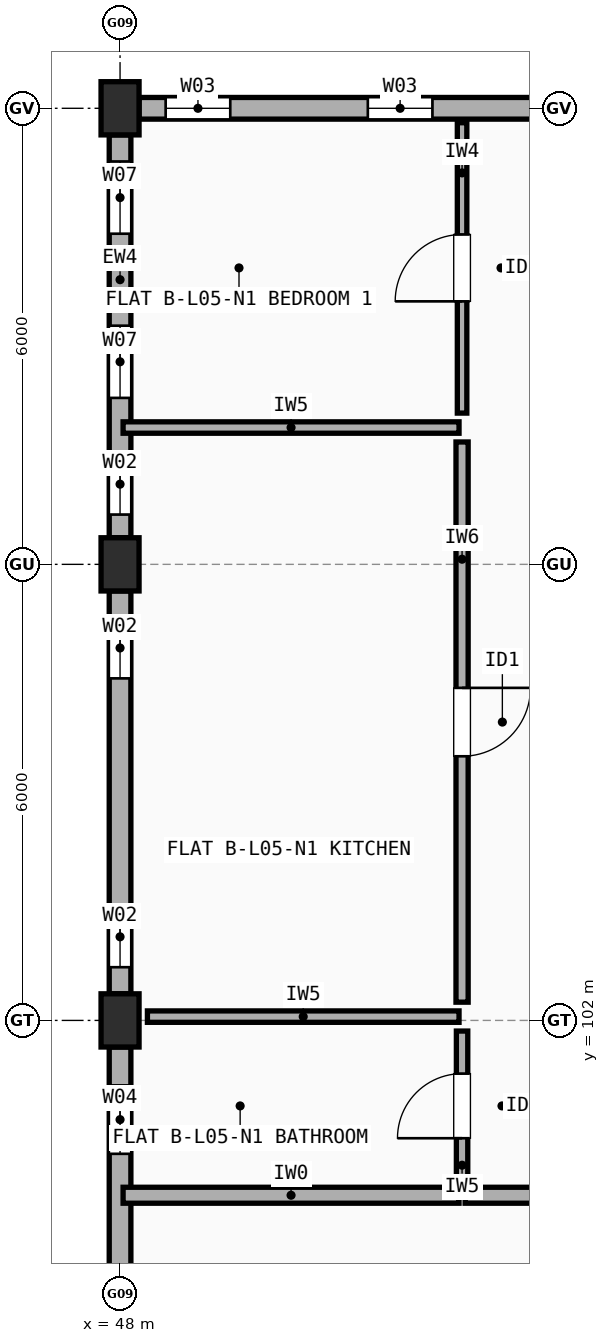
"""IFC4 building model, lengths in metres.
Left out: names, types, materials, properties, quantities, classifications, styles, units other than length and angle.
Written with IfcOpenShell. Run it as: python <this file> out.ifc"""

import sys

from ifc_helpers import new_model, si_unit, direction, frame, frame_2d, origin, origin_2d, place, context, subcontext, project, spatial, rectangle, extrude, element, fill, save


model = new_model("IFC4")
c1 = context("Model", 3, precision=1e-05, world=origin(), true_north=direction((0.0, 1.0)))
c2 = subcontext(c1, "Body", "Model", "MODEL_VIEW")
j1 = project(units=[si_unit("LENGTHUNIT", "METRE"), si_unit("PLANEANGLEUNIT", "RADIAN")], contexts=[c1])
p1 = place(None, origin())
s1 = spatial("IfcSite", under=j1, at=p1, CompositionType="ELEMENT")
p2 = place(p1, origin())
s2 = spatial("IfcBuilding", under=s1, at=p2, CompositionType="ELEMENT")
p3 = place(p2, frame((0.0, 0.0, 17.3)))
s3 = spatial("IfcBuildingStorey", under=s2, at=p3, CompositionType="ELEMENT", Elevation=17.3)
for number, where, z_axis, x_axis in (
    (1, (48.0, 102.0, 0.0), (0.0, 0.0, 1.0), (1.0, 0.0, 0.0)),
    (2, (48.0, 108.0, 0.0), (0.0, 0.0, 1.0), (1.0, 0.0, 0.0)),
    (3, (48.0, 114.0, 0.0), (0.0, 0.0, 1.0), (1.0, 0.0, 0.0)),
):
    element("IfcColumn", number, at=place(p3, frame(where, z_axis=z_axis, x_axis=x_axis)), inside=s3, PredefinedType="COLUMN", context=c2, shape_type="SweptSolid", body=[
        extrude(rectangle(XDim=0.5, YDim=0.7, at=origin_2d()), origin(), (0.0, 0.0, 1.0), 2.965),
    ])
p4 = place(p3, frame((53.725, 114.0, 0.0), z_axis=(0.0, 0.0, 1.0), x_axis=(-1.0, 0.0, 0.0)))
e4 = element("IfcWall", 4, at=p4, inside=s3, PredefinedType="STANDARD", context=c2, shape_type="SweptSolid", body=[
    extrude(rectangle(XDim=5.475, YDim=0.285, at=frame_2d((2.738, 0.0))), origin(), (0.0, 0.0, 1.0), 2.447),
])
p5 = place(p4, frame((1.615, 0.0, 0.9)))
e5 = element("IfcOpeningElement", 5, at=p5, cuts=e4, PredefinedType="OPENING", context=c2, shape_type="SweptSolid", body=[
    extrude(rectangle(XDim=0.85, YDim=1.25, at=frame_2d((0.425, 0.625))), frame((0.0, 0.152, 0.0), z_axis=(0.0, -1.0, 0.0), x_axis=(1.0, 0.0, 0.0)), (0.0, 0.0, 1.0), 0.305),
])
p6 = place(p4, frame((4.275, 0.0, 0.9)))
e6 = element("IfcOpeningElement", 6, at=p6, cuts=e4, PredefinedType="OPENING", context=c2, shape_type="SweptSolid", body=[
    extrude(rectangle(XDim=0.85, YDim=1.25, at=frame_2d((0.425, 0.625))), frame((0.0, 0.152, 0.0), z_axis=(0.0, -1.0, 0.0), x_axis=(1.0, 0.0, 0.0)), (0.0, 0.0, 1.0), 0.305),
])
p7 = place(p3, frame((48.0, 113.65, 0.0), z_axis=(0.0, 0.0, 1.0), x_axis=(0.0, -1.0, 0.0)))
e7 = element("IfcWall", 7, at=p7, inside=s3, PredefinedType="STANDARD", context=c2, shape_type="SweptSolid", body=[
    extrude(rectangle(XDim=5.3, YDim=0.285, at=frame_2d((2.65, 0.0))), origin(), (0.0, 0.0, 1.0), 2.447),
])
p8 = place(p7, frame((0.35, 0.0, 0.9)))
e8 = element("IfcOpeningElement", 8, at=p8, cuts=e7, PredefinedType="OPENING", context=c2, shape_type="SweptSolid", body=[
    extrude(rectangle(XDim=0.95, YDim=1.35, at=frame_2d((0.475, 0.675))), frame((0.0, 0.152, 0.0), z_axis=(0.0, -1.0, 0.0), x_axis=(1.0, 0.0, 0.0)), (0.0, 0.0, 1.0), 0.305),
])
p9 = place(p7, frame((2.51, 0.0, 0.9)))
e9 = element("IfcOpeningElement", 9, at=p9, cuts=e7, PredefinedType="OPENING", context=c2, shape_type="SweptSolid", body=[
    extrude(rectangle(XDim=0.95, YDim=1.35, at=frame_2d((0.475, 0.675))), frame((0.0, 0.152, 0.0), z_axis=(0.0, -1.0, 0.0), x_axis=(1.0, 0.0, 0.0)), (0.0, 0.0, 1.0), 0.305),
])
p10 = place(p7, frame((4.195, 0.0, 0.9)))
e10 = element("IfcOpeningElement", 10, at=p10, cuts=e7, PredefinedType="OPENING", context=c2, shape_type="SweptSolid", body=[
    extrude(rectangle(XDim=0.8, YDim=1.2, at=frame_2d((0.4, 0.6))), frame((0.0, 0.152, 0.0), z_axis=(0.0, -1.0, 0.0), x_axis=(1.0, 0.0, 0.0)), (0.0, 0.0, 1.0), 0.305),
])
p11 = place(p3, frame((48.0, 107.65, 0.0), z_axis=(0.0, 0.0, 1.0), x_axis=(0.0, -1.0, 0.0)))
e11 = element("IfcWall", 11, at=p11, inside=s3, PredefinedType="STANDARD", context=c2, shape_type="SweptSolid", body=[
    extrude(rectangle(XDim=5.3, YDim=0.285, at=frame_2d((2.65, 0.0))), origin(), (0.0, 0.0, 1.0), 2.447),
])
p12 = place(p11, frame((0.35, 0.0, 0.9)))
e12 = element("IfcOpeningElement", 12, at=p12, cuts=e11, PredefinedType="OPENING", context=c2, shape_type="SweptSolid", body=[
    extrude(rectangle(XDim=0.8, YDim=1.2, at=frame_2d((0.4, 0.6))), frame((0.0, 0.152, 0.0), z_axis=(0.0, -1.0, 0.0), x_axis=(1.0, 0.0, 0.0)), (0.0, 0.0, 1.0), 0.305),
])
p13 = place(p11, frame((4.15, 0.0, 0.9)))
e13 = element("IfcOpeningElement", 13, at=p13, cuts=e11, PredefinedType="OPENING", context=c2, shape_type="SweptSolid", body=[
    extrude(rectangle(XDim=0.8, YDim=1.2, at=frame_2d((0.4, 0.6))), frame((0.0, 0.152, 0.0), z_axis=(0.0, -1.0, 0.0), x_axis=(1.0, 0.0, 0.0)), (0.0, 0.0, 1.0), 0.305),
])
p14 = place(p3, frame((48.0, 101.65, 0.0), z_axis=(0.0, 0.0, 1.0), x_axis=(0.0, -1.0, 0.0)))
e14 = element("IfcWall", 14, at=p14, inside=s3, PredefinedType="STANDARD", context=c2, shape_type="SweptSolid", body=[
    extrude(rectangle(XDim=5.3, YDim=0.285, at=frame_2d((2.65, 0.0))), origin(), (0.0, 0.0, 1.0), 2.447),
])
p15 = place(p14, frame((0.505, 0.0, 0.9)))
e15 = element("IfcOpeningElement", 15, at=p15, cuts=e14, PredefinedType="OPENING", context=c2, shape_type="SweptSolid", body=[
    extrude(rectangle(XDim=0.9, YDim=1.3, at=frame_2d((0.45, 0.65))), frame((0.0, 0.152, 0.0), z_axis=(0.0, -1.0, 0.0), x_axis=(1.0, 0.0, 0.0)), (0.0, 0.0, 1.0), 0.305),
])
p16 = place(p14, frame((3.17, 0.0, 0.9)))
e16 = element("IfcOpeningElement", 16, at=p16, cuts=e14, PredefinedType="OPENING", context=c2, shape_type="SweptSolid", body=[
    extrude(rectangle(XDim=0.95, YDim=1.35, at=frame_2d((0.475, 0.675))), frame((0.0, 0.152, 0.0), z_axis=(0.0, -1.0, 0.0), x_axis=(1.0, 0.0, 0.0)), (0.0, 0.0, 1.0), 0.305),
])
p17 = place(p3, frame((48.04, 99.7, 0.0), z_axis=(0.0, 0.0, 1.0), x_axis=(1.0, 0.0, 0.0)))
e17 = element("IfcWall", 17, at=p17, inside=s3, PredefinedType="SOLIDWALL", context=c2, shape_type="SweptSolid", body=[
    extrude(rectangle(XDim=4.42, YDim=0.21, at=frame_2d((2.21, 0.0))), origin(), (0.0, 0.0, 1.0), 2.447),
])
p18 = place(p3, frame((52.54, 99.7, 0.0), z_axis=(0.0, 0.0, 1.0), x_axis=(1.0, 0.0, 0.0)))
e18 = element("IfcWall", 18, at=p18, inside=s3, PredefinedType="SOLIDWALL", context=c2, shape_type="SweptSolid", body=[
    extrude(rectangle(XDim=10.42, YDim=0.21, at=frame_2d((5.21, 0.0))), origin(), (0.0, 0.0, 1.0), 2.508),
])
p19 = place(p18, frame((4.685, 0.0, 0.0)))
e19 = element("IfcOpeningElement", 19, at=p19, cuts=e18, PredefinedType="OPENING", context=c2, shape_type="SweptSolid", body=[
    extrude(rectangle(XDim=1.05, YDim=2.15, at=frame_2d((0.525, 1.075))), frame((0.0, 0.115, 0.0), z_axis=(0.0, -1.0, 0.0), x_axis=(1.0, 0.0, 0.0)), (0.0, 0.0, 1.0), 0.23),
])
p20 = place(p3, frame((52.5, 109.99, 0.0), z_axis=(0.0, 0.0, 1.0), x_axis=(0.0, 1.0, 0.0)))
e20 = element("IfcWall", 20, at=p20, inside=s3, PredefinedType="PARTITIONING", context=c2, shape_type="SweptSolid", body=[
    extrude(rectangle(XDim=3.82, YDim=0.125, at=frame_2d((1.91, 0.0))), origin(), (0.0, 0.0, 1.0), 2.965),
])
p21 = place(p20, frame((1.47, 0.0, 0.0)))
e21 = element("IfcOpeningElement", 21, at=p21, cuts=e20, PredefinedType="OPENING", context=c2, shape_type="SweptSolid", body=[
    extrude(rectangle(XDim=0.88, YDim=2.1, at=frame_2d((0.44, 1.05))), frame((0.0, 0.073, 0.0), z_axis=(0.0, -1.0, 0.0), x_axis=(1.0, 0.0, 0.0)), (0.0, 0.0, 1.0), 0.145),
])
p22 = place(p3, frame((52.5, 102.24, 0.0), z_axis=(0.0, 0.0, 1.0), x_axis=(0.0, 1.0, 0.0)))
e22 = element("IfcWall", 22, at=p22, inside=s3, PredefinedType="PLUMBINGWALL", context=c2, shape_type="SweptSolid", body=[
    extrude(rectangle(XDim=7.37, YDim=0.16, at=frame_2d((3.685, 0.0))), origin(), (0.0, 0.0, 1.0), 2.447),
])
p23 = place(p22, frame((3.235, 0.0, 0.0)))
e23 = element("IfcOpeningElement", 23, at=p23, cuts=e22, PredefinedType="OPENING", context=c2, shape_type="SweptSolid", body=[
    extrude(rectangle(XDim=0.9, YDim=2.1, at=frame_2d((0.45, 1.05))), frame((0.0, 0.09, 0.0), z_axis=(0.0, -1.0, 0.0), x_axis=(1.0, 0.0, 0.0)), (0.0, 0.0, 1.0), 0.18),
])
p24 = place(p3, frame((52.5, 99.89, 0.0), z_axis=(0.0, 0.0, 1.0), x_axis=(0.0, 1.0, 0.0)))
e24 = element("IfcWall", 24, at=p24, inside=s3, PredefinedType="PARTITIONING", context=c2, shape_type="SweptSolid", body=[
    extrude(rectangle(XDim=1.97, YDim=0.15, at=frame_2d((0.985, 0.0))), origin(), (0.0, 0.0, 1.0), 2.965),
])
p25 = place(p24, frame((0.56, 0.0, 0.0)))
e25 = element("IfcOpeningElement", 25, at=p25, cuts=e24, PredefinedType="OPENING", context=c2, shape_type="SweptSolid", body=[
    extrude(rectangle(XDim=0.85, YDim=2.1, at=frame_2d((0.425, 1.05))), frame((0.0, 0.085, 0.0), z_axis=(0.0, -1.0, 0.0), x_axis=(1.0, 0.0, 0.0)), (0.0, 0.0, 1.0), 0.17),
])
p26 = place(p3, frame((48.04, 109.8, 0.0), z_axis=(0.0, 0.0, 1.0), x_axis=(1.0, 0.0, 0.0)))
e26 = element("IfcWall", 26, at=p26, inside=s3, PredefinedType="PARTITIONING", context=c2, shape_type="SweptSolid", body=[
    extrude(rectangle(XDim=4.42, YDim=0.15, at=frame_2d((2.21, 0.0))), origin(), (0.0, 0.0, 1.0), 2.447),
])
p27 = place(p3, frame((48.36, 102.05, 0.0), z_axis=(0.0, 0.0, 1.0), x_axis=(1.0, 0.0, 0.0)))
e27 = element("IfcWall", 27, at=p27, inside=s3, PredefinedType="PARTITIONING", context=c2, shape_type="SweptSolid", body=[
    extrude(rectangle(XDim=4.1, YDim=0.15, at=frame_2d((2.05, 0.0))), origin(), (0.0, 0.0, 1.0), 2.447),
])
p28 = place(p5, origin())
e28 = element("IfcWindow", 28, at=p28, inside=s3, PartitioningType="SINGLE_PANEL", PredefinedType="WINDOW", context=c2, shape_type="SweptSolid", body=[
    extrude(rectangle(XDim=0.85, YDim=1.25, at=frame_2d((0.425, 0.625))), frame((0.0, 0.03, 0.0), z_axis=(0.0, -1.0, 0.0), x_axis=(1.0, 0.0, 0.0)), (0.0, 0.0, 1.0), 0.06),
])
fill(e5, e28)
p29 = place(p6, origin())
e29 = element("IfcWindow", 29, at=p29, inside=s3, PartitioningType="SINGLE_PANEL", PredefinedType="WINDOW", context=c2, shape_type="SweptSolid", body=[
    extrude(rectangle(XDim=0.85, YDim=1.25, at=frame_2d((0.425, 0.625))), frame((0.0, 0.03, 0.0), z_axis=(0.0, -1.0, 0.0), x_axis=(1.0, 0.0, 0.0)), (0.0, 0.0, 1.0), 0.06),
])
fill(e6, e29)
p30 = place(p8, origin())
e30 = element("IfcWindow", 30, at=p30, inside=s3, PartitioningType="SINGLE_PANEL", PredefinedType="WINDOW", context=c2, shape_type="SweptSolid", body=[
    extrude(rectangle(XDim=0.95, YDim=1.35, at=frame_2d((0.475, 0.675))), frame((0.0, 0.03, 0.0), z_axis=(0.0, -1.0, 0.0), x_axis=(1.0, 0.0, 0.0)), (0.0, 0.0, 1.0), 0.06),
])
fill(e8, e30)
p31 = place(p9, origin())
e31 = element("IfcWindow", 31, at=p31, inside=s3, PartitioningType="SINGLE_PANEL", PredefinedType="WINDOW", context=c2, shape_type="SweptSolid", body=[
    extrude(rectangle(XDim=0.95, YDim=1.35, at=frame_2d((0.475, 0.675))), frame((0.0, 0.03, 0.0), z_axis=(0.0, -1.0, 0.0), x_axis=(1.0, 0.0, 0.0)), (0.0, 0.0, 1.0), 0.06),
])
fill(e9, e31)
p32 = place(p10, origin())
e32 = element("IfcWindow", 32, at=p32, inside=s3, PartitioningType="SINGLE_PANEL", PredefinedType="WINDOW", context=c2, shape_type="SweptSolid", body=[
    extrude(rectangle(XDim=0.8, YDim=1.2, at=frame_2d((0.4, 0.6))), frame((0.0, 0.03, 0.0), z_axis=(0.0, -1.0, 0.0), x_axis=(1.0, 0.0, 0.0)), (0.0, 0.0, 1.0), 0.06),
])
fill(e10, e32)
p33 = place(p12, origin())
e33 = element("IfcWindow", 33, at=p33, inside=s3, PartitioningType="SINGLE_PANEL", PredefinedType="WINDOW", context=c2, shape_type="SweptSolid", body=[
    extrude(rectangle(XDim=0.8, YDim=1.2, at=frame_2d((0.4, 0.6))), frame((0.0, 0.03, 0.0), z_axis=(0.0, -1.0, 0.0), x_axis=(1.0, 0.0, 0.0)), (0.0, 0.0, 1.0), 0.06),
])
fill(e12, e33)
p34 = place(p13, origin())
e34 = element("IfcWindow", 34, at=p34, inside=s3, PartitioningType="SINGLE_PANEL", PredefinedType="WINDOW", context=c2, shape_type="SweptSolid", body=[
    extrude(rectangle(XDim=0.8, YDim=1.2, at=frame_2d((0.4, 0.6))), frame((0.0, 0.03, 0.0), z_axis=(0.0, -1.0, 0.0), x_axis=(1.0, 0.0, 0.0)), (0.0, 0.0, 1.0), 0.06),
])
fill(e13, e34)
p35 = place(p15, origin())
e35 = element("IfcWindow", 35, at=p35, inside=s3, PartitioningType="SINGLE_PANEL", PredefinedType="WINDOW", context=c2, shape_type="SweptSolid", body=[
    extrude(rectangle(XDim=0.9, YDim=1.3, at=frame_2d((0.45, 0.65))), frame((0.0, 0.03, 0.0), z_axis=(0.0, -1.0, 0.0), x_axis=(1.0, 0.0, 0.0)), (0.0, 0.0, 1.0), 0.06),
])
fill(e15, e35)
p36 = place(p21, origin())
e36 = element("IfcDoor", 36, at=p36, inside=s3, OperationType="SINGLE_SWING_LEFT", PredefinedType="DOOR", context=c2, shape_type="SweptSolid", body=[
    extrude(rectangle(XDim=0.88, YDim=2.1, at=frame_2d((0.44, 1.05))), frame((0.0, 0.025, 0.0), z_axis=(0.0, -1.0, 0.0), x_axis=(1.0, 0.0, 0.0)), (0.0, 0.0, 1.0), 0.05),
])
fill(e21, e36)
p37 = place(p23, origin())
e37 = element("IfcDoor", 37, at=p37, inside=s3, OperationType="SINGLE_SWING_RIGHT", PredefinedType="DOOR", context=c2, shape_type="SweptSolid", body=[
    extrude(rectangle(XDim=0.9, YDim=2.1, at=frame_2d((0.45, 1.05))), frame((0.0, 0.025, 0.0), z_axis=(0.0, -1.0, 0.0), x_axis=(1.0, 0.0, 0.0)), (0.0, 0.0, 1.0), 0.05),
])
fill(e23, e37)
p38 = place(p25, origin())
e38 = element("IfcDoor", 38, at=p38, inside=s3, OperationType="SINGLE_SWING_LEFT", PredefinedType="DOOR", context=c2, shape_type="SweptSolid", body=[
    extrude(rectangle(XDim=0.85, YDim=2.1, at=frame_2d((0.425, 1.05))), frame((0.0, 0.025, 0.0), z_axis=(0.0, -1.0, 0.0), x_axis=(1.0, 0.0, 0.0)), (0.0, 0.0, 1.0), 0.05),
])
fill(e25, e38)
save(model, sys.argv[1])
